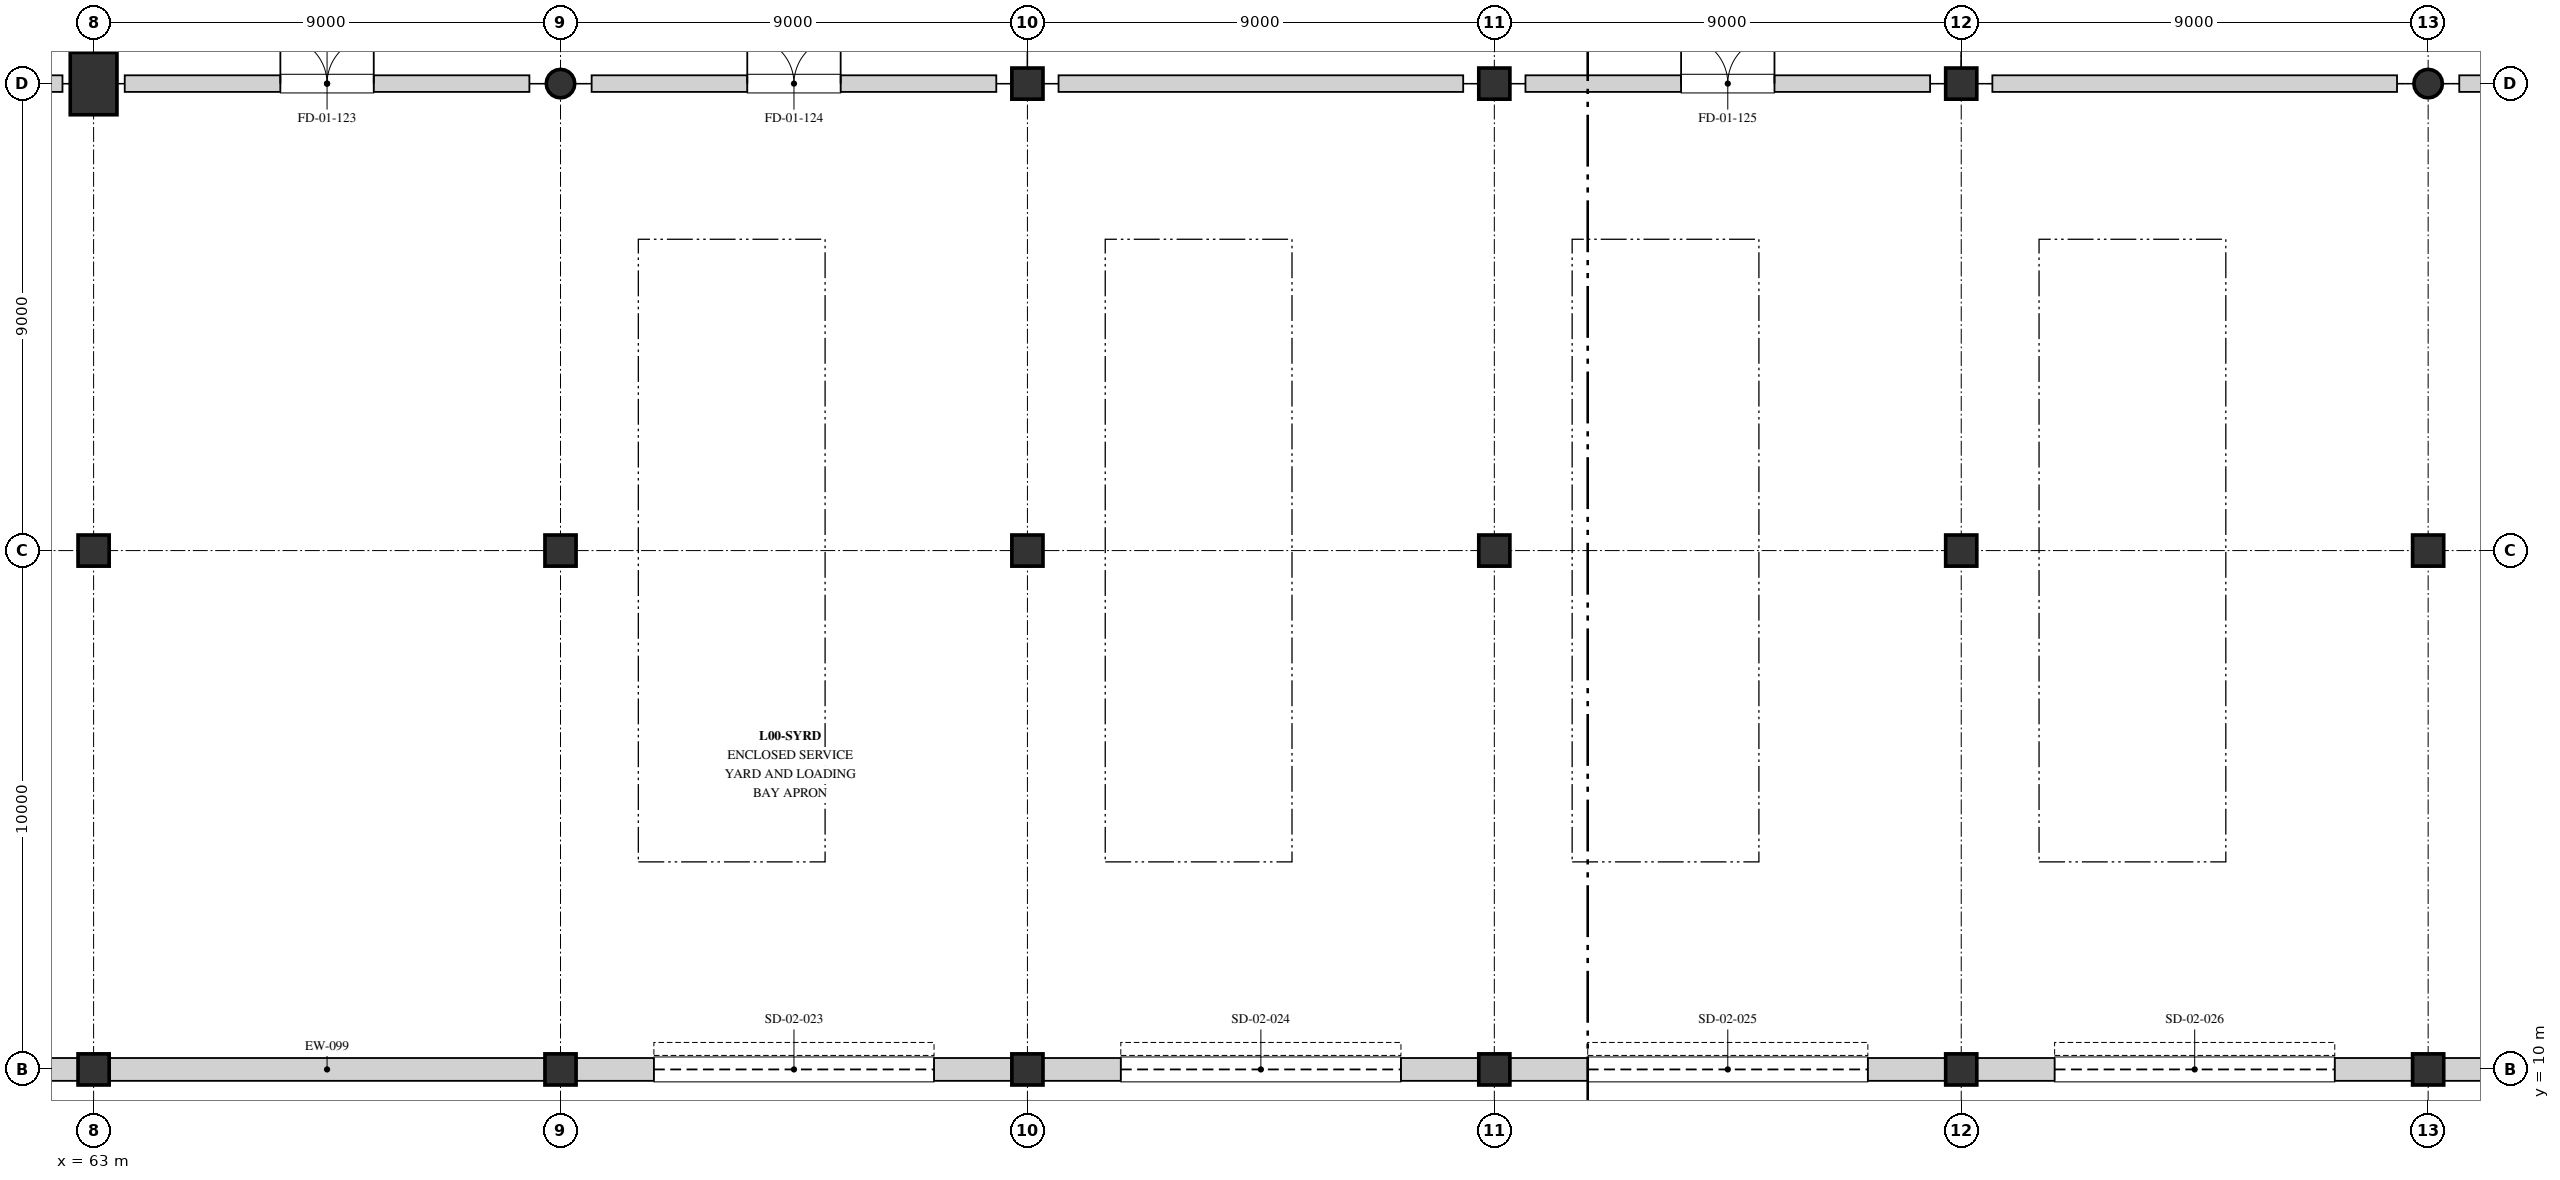
"""IFC4 building model, lengths in metres.
Left out: names, types, materials, properties, quantities, classifications, styles, units other than length and angle.
Written with IfcOpenShell. Run it as: python <this file> out.ifc"""

import sys

from ifc_helpers import new_model, si_unit, direction, frame, frame_2d, origin, origin_2d, place, context, subcontext, project, spatial, rectangle, circle, extrude, element, fill, save


model = new_model("IFC4")
c1 = context("Model", 3, precision=1e-05, world=origin(), true_north=direction((0.0, 1.0)))
c2 = subcontext(c1, "Body", "Model", "MODEL_VIEW")
j1 = project(units=[si_unit("LENGTHUNIT", "METRE"), si_unit("PLANEANGLEUNIT", "RADIAN")], contexts=[c1])
p1 = place(None, origin())
s1 = spatial("IfcSite", under=j1, at=p1, CompositionType="ELEMENT")
p2 = place(p1, origin())
s2 = spatial("IfcBuilding", under=s1, at=p2, CompositionType="ELEMENT")
p3 = place(p2, origin())
s3 = spatial("IfcBuildingStorey", under=s2, at=p3, CompositionType="ELEMENT", Elevation=0.0)
for number, where, z_axis, x_axis in (
    (1, (63.0, 10.0, 0.0), (0.0, 0.0, 1.0), (1.0, 0.0, 0.0)),
    (2, (63.0, 20.0, 0.0), (0.0, 0.0, 1.0), (1.0, 0.0, 0.0)),
):
    element("IfcColumn", number, at=place(p3, frame(where, z_axis=z_axis, x_axis=x_axis)), inside=s3, PredefinedType="COLUMN", context=c2, shape_type="SweptSolid", body=[
        extrude(rectangle(XDim=0.6, YDim=0.6, at=origin_2d()), origin(), (0.0, 0.0, 1.0), 4.06),
    ])
p4 = place(p3, frame((63.0, 29.0, 0.0), z_axis=(0.0, 0.0, 1.0), x_axis=(1.0, 0.0, 0.0)))
e3 = element("IfcColumn", 3, at=p4, inside=s3, PredefinedType="COLUMN", context=c2, shape_type="SweptSolid", body=[
    extrude(rectangle(XDim=0.9, YDim=1.2, at=origin_2d()), origin(), (0.0, 0.0, 1.0), 4.5),
])
for number, where, z_axis, x_axis in (
    (4, (72.0, 10.0, 0.0), (0.0, 0.0, 1.0), (1.0, 0.0, 0.0)),
    (5, (72.0, 20.0, 0.0), (0.0, 0.0, 1.0), (1.0, 0.0, 0.0)),
):
    element("IfcColumn", number, at=place(p3, frame(where, z_axis=z_axis, x_axis=x_axis)), inside=s3, PredefinedType="COLUMN", context=c2, shape_type="SweptSolid", body=[
        extrude(rectangle(XDim=0.6, YDim=0.6, at=origin_2d()), origin(), (0.0, 0.0, 1.0), 4.06),
    ])
p5 = place(p3, frame((72.0, 29.0, 0.0), z_axis=(0.0, 0.0, 1.0), x_axis=(1.0, 0.0, 0.0)))
e6 = element("IfcColumn", 6, at=p5, inside=s3, PredefinedType="COLUMN", context=c2, shape_type="SweptSolid", body=[
    extrude(circle(Radius=0.275, at=origin_2d()), origin(), (0.0, 0.0, 1.0), 4.5),
])
for number, where, z_axis, x_axis in (
    (7, (81.0, 10.0, 0.0), (0.0, 0.0, 1.0), (1.0, 0.0, 0.0)),
    (8, (81.0, 20.0, 0.0), (0.0, 0.0, 1.0), (1.0, 0.0, 0.0)),
):
    element("IfcColumn", number, at=place(p3, frame(where, z_axis=z_axis, x_axis=x_axis)), inside=s3, PredefinedType="COLUMN", context=c2, shape_type="SweptSolid", body=[
        extrude(rectangle(XDim=0.6, YDim=0.6, at=origin_2d()), origin(), (0.0, 0.0, 1.0), 4.06),
    ])
p6 = place(p3, frame((81.0, 29.0, 0.0), z_axis=(0.0, 0.0, 1.0), x_axis=(1.0, 0.0, 0.0)))
e9 = element("IfcColumn", 9, at=p6, inside=s3, PredefinedType="COLUMN", context=c2, shape_type="SweptSolid", body=[
    extrude(rectangle(XDim=0.6, YDim=0.6, at=origin_2d()), origin(), (0.0, 0.0, 1.0), 4.5),
])
for number, where, z_axis, x_axis in (
    (10, (90.0, 10.0, 0.0), (0.0, 0.0, 1.0), (1.0, 0.0, 0.0)),
    (11, (90.0, 20.0, 0.0), (0.0, 0.0, 1.0), (1.0, 0.0, 0.0)),
):
    element("IfcColumn", number, at=place(p3, frame(where, z_axis=z_axis, x_axis=x_axis)), inside=s3, PredefinedType="COLUMN", context=c2, shape_type="SweptSolid", body=[
        extrude(rectangle(XDim=0.6, YDim=0.6, at=origin_2d()), origin(), (0.0, 0.0, 1.0), 4.06),
    ])
p7 = place(p3, frame((90.0, 29.0, 0.0), z_axis=(0.0, 0.0, 1.0), x_axis=(1.0, 0.0, 0.0)))
e12 = element("IfcColumn", 12, at=p7, inside=s3, PredefinedType="COLUMN", context=c2, shape_type="SweptSolid", body=[
    extrude(rectangle(XDim=0.6, YDim=0.6, at=origin_2d()), origin(), (0.0, 0.0, 1.0), 4.5),
])
for number, where, z_axis, x_axis in (
    (13, (99.0, 10.0, 0.0), (0.0, 0.0, 1.0), (1.0, 0.0, 0.0)),
    (14, (99.0, 20.0, 0.0), (0.0, 0.0, 1.0), (1.0, 0.0, 0.0)),
):
    element("IfcColumn", number, at=place(p3, frame(where, z_axis=z_axis, x_axis=x_axis)), inside=s3, PredefinedType="COLUMN", context=c2, shape_type="SweptSolid", body=[
        extrude(rectangle(XDim=0.6, YDim=0.6, at=origin_2d()), origin(), (0.0, 0.0, 1.0), 4.06),
    ])
p8 = place(p3, frame((99.0, 29.0, 0.0), z_axis=(0.0, 0.0, 1.0), x_axis=(1.0, 0.0, 0.0)))
e15 = element("IfcColumn", 15, at=p8, inside=s3, PredefinedType="COLUMN", context=c2, shape_type="SweptSolid", body=[
    extrude(rectangle(XDim=0.6, YDim=0.6, at=origin_2d()), origin(), (0.0, 0.0, 1.0), 4.5),
])
for number, where, z_axis, x_axis in (
    (16, (108.0, 10.0, 0.0), (0.0, 0.0, 1.0), (1.0, 0.0, 0.0)),
    (17, (108.0, 20.0, 0.0), (0.0, 0.0, 1.0), (1.0, 0.0, 0.0)),
):
    element("IfcColumn", number, at=place(p3, frame(where, z_axis=z_axis, x_axis=x_axis)), inside=s3, PredefinedType="COLUMN", context=c2, shape_type="SweptSolid", body=[
        extrude(rectangle(XDim=0.6, YDim=0.6, at=origin_2d()), origin(), (0.0, 0.0, 1.0), 4.06),
    ])
p9 = place(p3, frame((108.0, 29.0, 0.0), z_axis=(0.0, 0.0, 1.0), x_axis=(1.0, 0.0, 0.0)))
e18 = element("IfcColumn", 18, at=p9, inside=s3, PredefinedType="COLUMN", context=c2, shape_type="SweptSolid", body=[
    extrude(circle(Radius=0.275, at=origin_2d()), origin(), (0.0, 0.0, 1.0), 4.5),
])
p10 = place(p3, frame((54.8, 10.0, 0.0), z_axis=(0.0, 0.0, 1.0), x_axis=(1.0, 0.0, 0.0)))
e19 = element("IfcWall", 19, at=p10, inside=s3, PredefinedType="STANDARD", context=c2, shape_type="SweptSolid", body=[
    extrude(rectangle(XDim=8.2, YDim=0.44, at=frame_2d((4.1, 0.0))), origin(), (0.0, 0.0, 1.0), 3.19),
])
p11 = place(p3, frame((63.0, 10.0, 0.0), z_axis=(0.0, 0.0, 1.0), x_axis=(1.0, 0.0, 0.0)))
e20 = element("IfcWall", 20, at=p11, inside=s3, PredefinedType="STANDARD", context=c2, shape_type="SweptSolid", body=[
    extrude(rectangle(XDim=9.0, YDim=0.44, at=frame_2d((4.5, 0.0))), origin(), (0.0, 0.0, 1.0), 3.19),
])
p12 = place(p3, frame((72.0, 10.0, 0.0), z_axis=(0.0, 0.0, 1.0), x_axis=(1.0, 0.0, 0.0)))
e21 = element("IfcWall", 21, at=p12, inside=s3, PredefinedType="STANDARD", context=c2, shape_type="SweptSolid", body=[
    extrude(rectangle(XDim=9.0, YDim=0.44, at=frame_2d((4.5, 0.0))), origin(), (0.0, 0.0, 1.0), 3.19),
])
p13 = place(p12, frame((1.8, 0.0, 0.0)))
e22 = element("IfcOpeningElement", 22, at=p13, cuts=e21, PredefinedType="OPENING", context=c2, shape_type="SweptSolid", body=[
    extrude(rectangle(XDim=5.4, YDim=3.03, at=frame_2d((2.7, 1.515))), frame((0.0, 0.23, 0.0), z_axis=(0.0, -1.0, 0.0), x_axis=(1.0, 0.0, 0.0)), (0.0, 0.0, 1.0), 0.46),
])
p14 = place(p3, frame((81.0, 10.0, 0.0), z_axis=(0.0, 0.0, 1.0), x_axis=(1.0, 0.0, 0.0)))
e23 = element("IfcWall", 23, at=p14, inside=s3, PredefinedType="STANDARD", context=c2, shape_type="SweptSolid", body=[
    extrude(rectangle(XDim=9.0, YDim=0.44, at=frame_2d((4.5, 0.0))), origin(), (0.0, 0.0, 1.0), 3.19),
])
p15 = place(p14, frame((1.8, 0.0, 0.0)))
e24 = element("IfcOpeningElement", 24, at=p15, cuts=e23, PredefinedType="OPENING", context=c2, shape_type="SweptSolid", body=[
    extrude(rectangle(XDim=5.4, YDim=3.03, at=frame_2d((2.7, 1.515))), frame((0.0, 0.23, 0.0), z_axis=(0.0, -1.0, 0.0), x_axis=(1.0, 0.0, 0.0)), (0.0, 0.0, 1.0), 0.46),
])
p16 = place(p3, frame((90.0, 10.0, 0.0), z_axis=(0.0, 0.0, 1.0), x_axis=(1.0, 0.0, 0.0)))
e25 = element("IfcWall", 25, at=p16, inside=s3, PredefinedType="STANDARD", context=c2, shape_type="SweptSolid", body=[
    extrude(rectangle(XDim=9.0, YDim=0.44, at=frame_2d((4.5, 0.0))), origin(), (0.0, 0.0, 1.0), 3.19),
])
p17 = place(p16, frame((1.8, 0.0, 0.0)))
e26 = element("IfcOpeningElement", 26, at=p17, cuts=e25, PredefinedType="OPENING", context=c2, shape_type="SweptSolid", body=[
    extrude(rectangle(XDim=5.4, YDim=3.03, at=frame_2d((2.7, 1.515))), frame((0.0, 0.23, 0.0), z_axis=(0.0, -1.0, 0.0), x_axis=(1.0, 0.0, 0.0)), (0.0, 0.0, 1.0), 0.46),
])
p18 = place(p3, frame((99.0, 10.0, 0.0), z_axis=(0.0, 0.0, 1.0), x_axis=(1.0, 0.0, 0.0)))
e27 = element("IfcWall", 27, at=p18, inside=s3, PredefinedType="STANDARD", context=c2, shape_type="SweptSolid", body=[
    extrude(rectangle(XDim=9.0, YDim=0.44, at=frame_2d((4.5, 0.0))), origin(), (0.0, 0.0, 1.0), 3.19),
])
p19 = place(p18, frame((1.8, 0.0, 0.0)))
e28 = element("IfcOpeningElement", 28, at=p19, cuts=e27, PredefinedType="OPENING", context=c2, shape_type="SweptSolid", body=[
    extrude(rectangle(XDim=5.4, YDim=3.03, at=frame_2d((2.7, 1.515))), frame((0.0, 0.23, 0.0), z_axis=(0.0, -1.0, 0.0), x_axis=(1.0, 0.0, 0.0)), (0.0, 0.0, 1.0), 0.46),
])
p20 = place(p3, frame((108.0, 10.0, 0.0), z_axis=(0.0, 0.0, 1.0), x_axis=(1.0, 0.0, 0.0)))
e29 = element("IfcWall", 29, at=p20, inside=s3, PredefinedType="STANDARD", context=c2, shape_type="SweptSolid", body=[
    extrude(rectangle(XDim=9.0, YDim=0.44, at=frame_2d((4.5, 0.0))), origin(), (0.0, 0.0, 1.0), 3.19),
])
p21 = place(p3, frame((55.5, 29.0, 0.0), z_axis=(0.0, 0.0, 1.0), x_axis=(1.0, 0.0, 0.0)))
e30 = element("IfcWall", 30, at=p21, inside=s3, PredefinedType="SOLIDWALL", context=c2, shape_type="SweptSolid", body=[
    extrude(rectangle(XDim=6.9, YDim=0.32, at=frame_2d((3.45, 0.0))), origin(), (0.0, 0.0, 1.0), 3.2),
])
p22 = place(p3, frame((63.6, 29.0, 0.0), z_axis=(0.0, 0.0, 1.0), x_axis=(1.0, 0.0, 0.0)))
e31 = element("IfcWall", 31, at=p22, inside=s3, PredefinedType="SOLIDWALL", context=c2, shape_type="SweptSolid", body=[
    extrude(rectangle(XDim=7.8, YDim=0.32, at=frame_2d((3.9, 0.0))), origin(), (0.0, 0.0, 1.0), 3.2),
])
p23 = place(p22, frame((3.0, 0.0, 0.0)))
e32 = element("IfcOpeningElement", 32, at=p23, cuts=e31, PredefinedType="OPENING", context=c2, shape_type="SweptSolid", body=[
    extrude(rectangle(XDim=1.8, YDim=2.2, at=frame_2d((0.9, 1.1))), frame((0.0, 0.17, 0.0), z_axis=(0.0, -1.0, 0.0), x_axis=(1.0, 0.0, 0.0)), (0.0, 0.0, 1.0), 0.34),
])
p24 = place(p3, frame((72.6, 29.0, 0.0), z_axis=(0.0, 0.0, 1.0), x_axis=(1.0, 0.0, 0.0)))
e33 = element("IfcWall", 33, at=p24, inside=s3, PredefinedType="SOLIDWALL", context=c2, shape_type="SweptSolid", body=[
    extrude(rectangle(XDim=7.8, YDim=0.32, at=frame_2d((3.9, 0.0))), origin(), (0.0, 0.0, 1.0), 3.2),
])
p25 = place(p24, frame((3.0, 0.0, 0.0)))
e34 = element("IfcOpeningElement", 34, at=p25, cuts=e33, PredefinedType="OPENING", context=c2, shape_type="SweptSolid", body=[
    extrude(rectangle(XDim=1.8, YDim=2.2, at=frame_2d((0.9, 1.1))), frame((0.0, 0.17, 0.0), z_axis=(0.0, -1.0, 0.0), x_axis=(1.0, 0.0, 0.0)), (0.0, 0.0, 1.0), 0.34),
])
p26 = place(p3, frame((81.6, 29.0, 0.0), z_axis=(0.0, 0.0, 1.0), x_axis=(1.0, 0.0, 0.0)))
e35 = element("IfcWall", 35, at=p26, inside=s3, PredefinedType="SOLIDWALL", context=c2, shape_type="SweptSolid", body=[
    extrude(rectangle(XDim=7.8, YDim=0.32, at=frame_2d((3.9, 0.0))), origin(), (0.0, 0.0, 1.0), 3.2),
])
p27 = place(p3, frame((90.6, 29.0, 0.0), z_axis=(0.0, 0.0, 1.0), x_axis=(1.0, 0.0, 0.0)))
e36 = element("IfcWall", 36, at=p27, inside=s3, PredefinedType="SOLIDWALL", context=c2, shape_type="SweptSolid", body=[
    extrude(rectangle(XDim=7.8, YDim=0.32, at=frame_2d((3.9, 0.0))), origin(), (0.0, 0.0, 1.0), 3.2),
])
p28 = place(p27, frame((3.0, 0.0, 0.0)))
e37 = element("IfcOpeningElement", 37, at=p28, cuts=e36, PredefinedType="OPENING", context=c2, shape_type="SweptSolid", body=[
    extrude(rectangle(XDim=1.8, YDim=2.2, at=frame_2d((0.9, 1.1))), frame((0.0, 0.17, 0.0), z_axis=(0.0, -1.0, 0.0), x_axis=(1.0, 0.0, 0.0)), (0.0, 0.0, 1.0), 0.34),
])
p29 = place(p3, frame((99.6, 29.0, 0.0), z_axis=(0.0, 0.0, 1.0), x_axis=(1.0, 0.0, 0.0)))
e38 = element("IfcWall", 38, at=p29, inside=s3, PredefinedType="SOLIDWALL", context=c2, shape_type="SweptSolid", body=[
    extrude(rectangle(XDim=7.8, YDim=0.32, at=frame_2d((3.9, 0.0))), origin(), (0.0, 0.0, 1.0), 3.2),
])
p30 = place(p3, frame((108.6, 29.0, 0.0), z_axis=(0.0, 0.0, 1.0), x_axis=(1.0, 0.0, 0.0)))
e39 = element("IfcWall", 39, at=p30, inside=s3, PredefinedType="SOLIDWALL", context=c2, shape_type="SweptSolid", body=[
    extrude(rectangle(XDim=7.8, YDim=0.32, at=frame_2d((3.9, 0.0))), origin(), (0.0, 0.0, 1.0), 3.2),
])
p31 = place(p30, frame((3.1, 0.0, 0.0)))
e40 = element("IfcOpeningElement", 40, at=p31, cuts=e39, PredefinedType="OPENING", context=c2, shape_type="SweptSolid", body=[
    extrude(rectangle(XDim=1.6, YDim=2.2, at=frame_2d((0.8, 1.1))), frame((0.0, 0.17, 0.0), z_axis=(0.0, -1.0, 0.0), x_axis=(1.0, 0.0, 0.0)), (0.0, 0.0, 1.0), 0.34),
])
p32 = place(p13, origin())
e41 = element("IfcDoor", 41, at=p32, inside=s3, OperationType="ROLLINGUP", PredefinedType="GATE", context=c2, shape_type="SweptSolid", body=[
    extrude(rectangle(XDim=5.4, YDim=3.03, at=frame_2d((2.7, 1.515))), frame((0.0, 0.025, 0.0), z_axis=(0.0, -1.0, 0.0), x_axis=(1.0, 0.0, 0.0)), (0.0, 0.0, 1.0), 0.05),
])
fill(e22, e41)
p33 = place(p15, origin())
e42 = element("IfcDoor", 42, at=p33, inside=s3, OperationType="ROLLINGUP", PredefinedType="GATE", context=c2, shape_type="SweptSolid", body=[
    extrude(rectangle(XDim=5.4, YDim=3.03, at=frame_2d((2.7, 1.515))), frame((0.0, 0.025, 0.0), z_axis=(0.0, -1.0, 0.0), x_axis=(1.0, 0.0, 0.0)), (0.0, 0.0, 1.0), 0.05),
])
fill(e24, e42)
p34 = place(p17, origin())
e43 = element("IfcDoor", 43, at=p34, inside=s3, OperationType="ROLLINGUP", PredefinedType="GATE", context=c2, shape_type="SweptSolid", body=[
    extrude(rectangle(XDim=5.4, YDim=3.03, at=frame_2d((2.7, 1.515))), frame((0.0, 0.025, 0.0), z_axis=(0.0, -1.0, 0.0), x_axis=(1.0, 0.0, 0.0)), (0.0, 0.0, 1.0), 0.05),
])
fill(e26, e43)
p35 = place(p19, origin())
e44 = element("IfcDoor", 44, at=p35, inside=s3, OperationType="ROLLINGUP", PredefinedType="GATE", context=c2, shape_type="SweptSolid", body=[
    extrude(rectangle(XDim=5.4, YDim=3.03, at=frame_2d((2.7, 1.515))), frame((0.0, 0.025, 0.0), z_axis=(0.0, -1.0, 0.0), x_axis=(1.0, 0.0, 0.0)), (0.0, 0.0, 1.0), 0.05),
])
fill(e28, e44)
p36 = place(p23, origin())
e45 = element("IfcDoor", 45, at=p36, inside=s3, OperationType="DOUBLE_DOOR_SINGLE_SWING", PredefinedType="DOOR", context=c2, shape_type="SweptSolid", body=[
    extrude(rectangle(XDim=1.8, YDim=2.2, at=frame_2d((0.9, 1.1))), frame((0.0, 0.025, 0.0), z_axis=(0.0, -1.0, 0.0), x_axis=(1.0, 0.0, 0.0)), (0.0, 0.0, 1.0), 0.05),
])
fill(e32, e45)
p37 = place(p25, origin())
e46 = element("IfcDoor", 46, at=p37, inside=s3, OperationType="DOUBLE_DOOR_SINGLE_SWING", PredefinedType="DOOR", context=c2, shape_type="SweptSolid", body=[
    extrude(rectangle(XDim=1.8, YDim=2.2, at=frame_2d((0.9, 1.1))), frame((0.0, 0.025, 0.0), z_axis=(0.0, -1.0, 0.0), x_axis=(1.0, 0.0, 0.0)), (0.0, 0.0, 1.0), 0.05),
])
fill(e34, e46)
p38 = place(p28, origin())
e47 = element("IfcDoor", 47, at=p38, inside=s3, OperationType="DOUBLE_DOOR_SINGLE_SWING", PredefinedType="DOOR", context=c2, shape_type="SweptSolid", body=[
    extrude(rectangle(XDim=1.8, YDim=2.2, at=frame_2d((0.9, 1.1))), frame((0.0, 0.025, 0.0), z_axis=(0.0, -1.0, 0.0), x_axis=(1.0, 0.0, 0.0)), (0.0, 0.0, 1.0), 0.05),
])
fill(e37, e47)
save(model, sys.argv[1])
